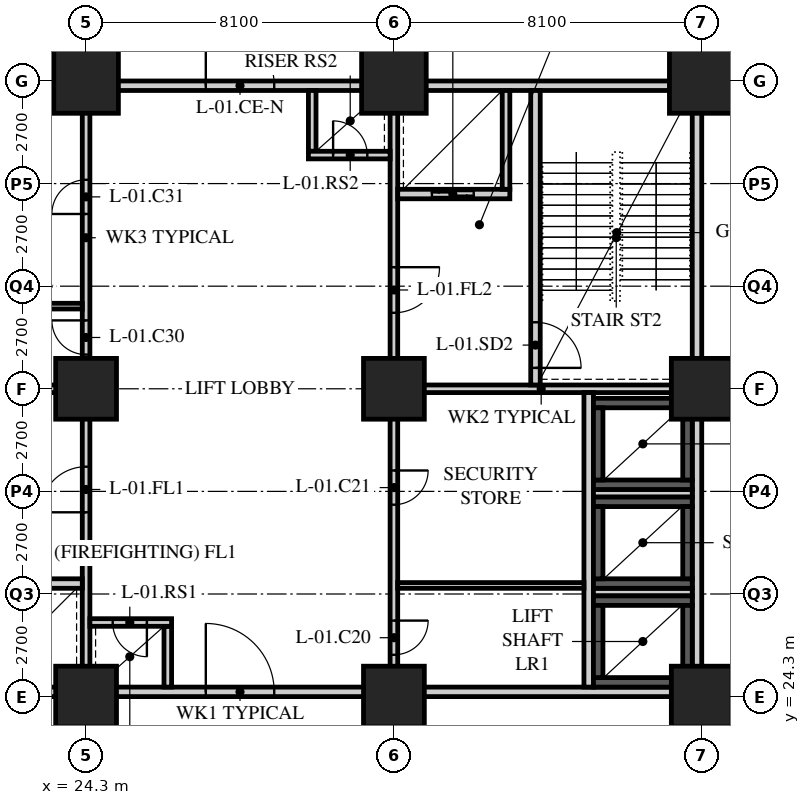
"""IFC4 building model, lengths in metres.
Left out: names, types, materials, properties, quantities, classifications, styles, units other than length and angle.
Written with IfcOpenShell. Run it as: python <this file> out.ifc"""

import sys

from ifc_helpers import new_model, si_unit, direction, frame, frame_2d, origin, origin_2d, place, context, subcontext, project, spatial, rectangle, hollow_rectangle, extrude, element, fill, save


model = new_model("IFC4")
c1 = context("Model", 3, precision=1e-05, world=origin(), true_north=direction((0.0, 1.0)))
c2 = subcontext(c1, "Body", "Model", "MODEL_VIEW")
j1 = project(units=[si_unit("LENGTHUNIT", "METRE"), si_unit("PLANEANGLEUNIT", "RADIAN")], contexts=[c1])
p1 = place(None, origin())
s1 = spatial("IfcSite", under=j1, at=p1, CompositionType="ELEMENT")
p2 = place(p1, origin())
s2 = spatial("IfcBuilding", under=s1, at=p2, CompositionType="ELEMENT")
p3 = place(p2, frame((0.0, 0.0, -4.2)))
s3 = spatial("IfcBuildingStorey", under=s2, at=p3, CompositionType="ELEMENT", Elevation=-4.2)
for number, where, z_axis, x_axis in (
    (1, (24.3, 24.3, 0.0), (0.0, 0.0, 1.0), (1.0, 0.0, 0.0)),
    (2, (24.3, 32.4, 0.0), (0.0, 0.0, 1.0), (1.0, 0.0, 0.0)),
):
    element("IfcColumn", number, at=place(p3, frame(where, z_axis=z_axis, x_axis=x_axis)), inside=s3, PredefinedType="COLUMN", context=c2, shape_type="SweptSolid", body=[
        extrude(hollow_rectangle(XDim=1.6, YDim=1.6, WallThickness=0.15, at=origin_2d()), origin(), (0.0, 0.0, 1.0), 4.2),
    ])
p4 = place(p3, frame((24.3, 40.5, 0.0), z_axis=(0.0, 0.0, 1.0), x_axis=(1.0, 0.0, 0.0)))
e3 = element("IfcColumn", 3, at=p4, inside=s3, PredefinedType="COLUMN", context=c2, shape_type="SweptSolid", body=[
    extrude(hollow_rectangle(XDim=1.7, YDim=1.7, WallThickness=0.16, at=origin_2d()), origin(), (0.0, 0.0, 1.0), 4.2),
])
for number, where, z_axis, x_axis in (
    (4, (32.4, 24.3, 0.0), (0.0, 0.0, 1.0), (1.0, 0.0, 0.0)),
    (5, (32.4, 32.4, 0.0), (0.0, 0.0, 1.0), (1.0, 0.0, 0.0)),
):
    element("IfcColumn", number, at=place(p3, frame(where, z_axis=z_axis, x_axis=x_axis)), inside=s3, PredefinedType="COLUMN", context=c2, shape_type="SweptSolid", body=[
        extrude(hollow_rectangle(XDim=1.6, YDim=1.6, WallThickness=0.15, at=origin_2d()), origin(), (0.0, 0.0, 1.0), 4.2),
    ])
p5 = place(p3, frame((32.4, 40.5, 0.0), z_axis=(0.0, 0.0, 1.0), x_axis=(1.0, 0.0, 0.0)))
e6 = element("IfcColumn", 6, at=p5, inside=s3, PredefinedType="COLUMN", context=c2, shape_type="SweptSolid", body=[
    extrude(hollow_rectangle(XDim=1.7, YDim=1.7, WallThickness=0.16, at=origin_2d()), origin(), (0.0, 0.0, 1.0), 4.2),
])
for number, where, z_axis, x_axis in (
    (7, (40.5, 24.3, 0.0), (0.0, 0.0, 1.0), (1.0, 0.0, 0.0)),
    (8, (40.5, 32.4, 0.0), (0.0, 0.0, 1.0), (1.0, 0.0, 0.0)),
):
    element("IfcColumn", number, at=place(p3, frame(where, z_axis=z_axis, x_axis=x_axis)), inside=s3, PredefinedType="COLUMN", context=c2, shape_type="SweptSolid", body=[
        extrude(hollow_rectangle(XDim=1.6, YDim=1.6, WallThickness=0.15, at=origin_2d()), origin(), (0.0, 0.0, 1.0), 4.2),
    ])
p6 = place(p3, frame((40.5, 40.5, 0.0), z_axis=(0.0, 0.0, 1.0), x_axis=(1.0, 0.0, 0.0)))
e9 = element("IfcColumn", 9, at=p6, inside=s3, PredefinedType="COLUMN", context=c2, shape_type="SweptSolid", body=[
    extrude(hollow_rectangle(XDim=1.7, YDim=1.7, WallThickness=0.16, at=origin_2d()), origin(), (0.0, 0.0, 1.0), 4.2),
])
p7 = place(p3, frame((16.2, 24.425, 0.0), z_axis=(0.0, 0.0, 1.0), x_axis=(1.0, 0.0, 0.0)))
e10 = element("IfcWall", 10, at=p7, inside=s3, PredefinedType="SOLIDWALL", context=c2, shape_type="SweptSolid", body=[
    extrude(rectangle(XDim=24.3, YDim=0.25, at=frame_2d((12.15, 0.0))), origin(), (0.0, 0.0, 1.0), 3.3),
])
p8 = place(p7, frame((11.25, 0.0, 0.0)))
e11 = element("IfcOpeningElement", 11, at=p8, cuts=e10, PredefinedType="OPENING", context=c2, shape_type="SweptSolid", body=[
    extrude(rectangle(XDim=1.8, YDim=2.4, at=frame_2d((0.9, 1.2))), frame((0.0, 0.135, 0.0), z_axis=(0.0, -1.0, 0.0), x_axis=(1.0, 0.0, 0.0)), (0.0, 0.0, 1.0), 0.27),
])
p9 = place(p3, frame((16.2, 40.375, 0.0), z_axis=(0.0, 0.0, 1.0), x_axis=(1.0, 0.0, 0.0)))
e12 = element("IfcWall", 12, at=p9, inside=s3, PredefinedType="SOLIDWALL", context=c2, shape_type="SweptSolid", body=[
    extrude(rectangle(XDim=24.3, YDim=0.25, at=frame_2d((12.15, 0.0))), origin(), (0.0, 0.0, 1.0), 3.3),
])
p10 = place(p9, frame((11.25, 0.0, 0.0)))
e13 = element("IfcOpeningElement", 13, at=p10, cuts=e12, PredefinedType="OPENING", context=c2, shape_type="SweptSolid", body=[
    extrude(rectangle(XDim=1.8, YDim=2.4, at=frame_2d((0.9, 1.2))), frame((0.0, 0.135, 0.0), z_axis=(0.0, -1.0, 0.0), x_axis=(1.0, 0.0, 0.0)), (0.0, 0.0, 1.0), 0.27),
])
p11 = place(p3, frame((40.375, 24.55, 0.0), z_axis=(0.0, 0.0, 1.0), x_axis=(0.0, 1.0, 0.0)))
e14 = element("IfcWall", 14, at=p11, inside=s3, PredefinedType="SOLIDWALL", context=c2, shape_type="SweptSolid", body=[
    extrude(rectangle(XDim=15.7, YDim=0.25, at=frame_2d((7.85, 0.0))), origin(), (0.0, 0.0, 1.0), 3.338),
])
p12 = place(p3, frame((16.45, 32.4, 0.0), z_axis=(0.0, 0.0, 1.0), x_axis=(1.0, 0.0, 0.0)))
e15 = element("IfcWall", 15, at=p12, inside=s3, PredefinedType="SOLIDWALL", context=c2, shape_type="SweptSolid", body=[
    extrude(rectangle(XDim=7.95, YDim=0.2, at=frame_2d((3.975, 0.0))), origin(), (0.0, 0.0, 1.0), 3.25),
])
p13 = place(p3, frame((24.3, 24.55, 0.0), z_axis=(0.0, 0.0, 1.0), x_axis=(0.0, 1.0, 0.0)))
e16 = element("IfcWall", 16, at=p13, inside=s3, PredefinedType="SOLIDWALL", context=c2, shape_type="SweptSolid", body=[
    extrude(rectangle(XDim=7.75, YDim=0.2, at=frame_2d((3.875, 0.0))), origin(), (0.0, 0.0, 1.0), 3.25),
])
p14 = place(p13, frame((4.6, 0.0, 0.0)))
e17 = element("IfcOpeningElement", 17, at=p14, cuts=e16, PredefinedType="OPENING", context=c2, shape_type="SweptSolid", body=[
    extrude(rectangle(XDim=1.2, YDim=2.1, at=frame_2d((0.6, 1.05))), frame((0.0, 0.11, 0.0), z_axis=(0.0, -1.0, 0.0), x_axis=(1.0, 0.0, 0.0)), (0.0, 0.0, 1.0), 0.22),
])
p15 = place(p3, frame((21.25, 27.275, 0.0), z_axis=(0.0, 0.0, 1.0), x_axis=(1.0, 0.0, 0.0)))
e18 = element("IfcWall", 18, at=p15, inside=s3, PredefinedType="SOLIDWALL", context=c2, shape_type="SweptSolid", body=[
    extrude(rectangle(XDim=2.95, YDim=0.25, at=frame_2d((1.475, 0.0))), origin(), (0.0, 0.0, 1.0), 3.95),
])
p16 = place(p15, frame((0.95, 0.0, 0.0)))
e19 = element("IfcOpeningElement", 19, at=p16, cuts=e18, PredefinedType="OPENING", context=c2, shape_type="SweptSolid", body=[
    extrude(rectangle(XDim=1.1, YDim=2.4, at=frame_2d((0.55, 1.2))), frame((0.0, 0.135, 0.0), z_axis=(0.0, -1.0, 0.0), x_axis=(1.0, 0.0, 0.0)), (0.0, 0.0, 1.0), 0.27),
])
p17 = place(p3, frame((26.45, 24.55, 0.0), z_axis=(0.0, 0.0, 1.0), x_axis=(0.0, 1.0, 0.0)))
e20 = element("IfcWall", 20, at=p17, inside=s3, PredefinedType="SOLIDWALL", context=c2, shape_type="SweptSolid", body=[
    extrude(rectangle(XDim=1.6, YDim=0.2, at=frame_2d((0.8, 0.0))), origin(), (0.0, 0.0, 1.0), 3.95),
])
p18 = place(p3, frame((24.4, 26.25, 0.0), z_axis=(0.0, 0.0, 1.0), x_axis=(1.0, 0.0, 0.0)))
e21 = element("IfcWall", 21, at=p18, inside=s3, PredefinedType="SOLIDWALL", context=c2, shape_type="SweptSolid", body=[
    extrude(rectangle(XDim=2.15, YDim=0.2, at=frame_2d((1.075, 0.0))), origin(), (0.0, 0.0, 1.0), 3.95),
])
p19 = place(p18, frame((0.6, 0.0, 0.0)))
e22 = element("IfcOpeningElement", 22, at=p19, cuts=e21, PredefinedType="OPENING", context=c2, shape_type="SweptSolid", body=[
    extrude(rectangle(XDim=0.9, YDim=2.1, at=frame_2d((0.45, 1.05))), frame((0.0, 0.11, 0.0), z_axis=(0.0, -1.0, 0.0), x_axis=(1.0, 0.0, 0.0)), (0.0, 0.0, 1.0), 0.22),
])
p20 = place(p3, frame((32.3, 32.4, 0.0), z_axis=(0.0, 0.0, 1.0), x_axis=(1.0, 0.0, 0.0)))
e23 = element("IfcWall", 23, at=p20, inside=s3, PredefinedType="SOLIDWALL", context=c2, shape_type="SweptSolid", body=[
    extrude(rectangle(XDim=7.95, YDim=0.2, at=frame_2d((3.975, 0.0))), origin(), (0.0, 0.0, 1.0), 3.25),
])
p21 = place(p3, frame((32.4, 32.5, 0.0), z_axis=(0.0, 0.0, 1.0), x_axis=(0.0, 1.0, 0.0)))
e24 = element("IfcWall", 24, at=p21, inside=s3, PredefinedType="SOLIDWALL", context=c2, shape_type="SweptSolid", body=[
    extrude(rectangle(XDim=7.75, YDim=0.2, at=frame_2d((3.875, 0.0))), origin(), (0.0, 0.0, 1.0), 3.25),
])
p22 = place(p21, frame((1.9, 0.0, 0.0)))
e25 = element("IfcOpeningElement", 25, at=p22, cuts=e24, PredefinedType="OPENING", context=c2, shape_type="SweptSolid", body=[
    extrude(rectangle(XDim=1.2, YDim=2.1, at=frame_2d((0.6, 1.05))), frame((0.0, 0.11, 0.0), z_axis=(0.0, -1.0, 0.0), x_axis=(1.0, 0.0, 0.0)), (0.0, 0.0, 1.0), 0.22),
])
p23 = place(p3, frame((37.525, 24.55, 0.0), z_axis=(0.0, 0.0, 1.0), x_axis=(0.0, 1.0, 0.0)))
e26 = element("IfcWall", 26, at=p23, inside=s3, PredefinedType="SOLIDWALL", context=c2, shape_type="SweptSolid", body=[
    extrude(rectangle(XDim=7.75, YDim=0.25, at=frame_2d((3.875, 0.0))), origin(), (0.0, 0.0, 1.0), 3.95),
])
for number, where, z_axis, x_axis in (
    (27, (37.65, 27.05, 0.0), (0.0, 0.0, 1.0), (1.0, 0.0, 0.0)),
    (28, (37.65, 29.65, 0.0), (0.0, 0.0, 1.0), (1.0, 0.0, 0.0)),
):
    element("IfcWall", number, at=place(p3, frame(where, z_axis=z_axis, x_axis=x_axis)), inside=s3, PredefinedType="SOLIDWALL", context=c2, shape_type="SweptSolid", body=[
        extrude(rectangle(XDim=2.6, YDim=0.2, at=frame_2d((1.3, 0.0))), origin(), (0.0, 0.0, 1.0), 3.95),
    ])
p24 = place(p3, frame((36.125, 32.5, 0.0), z_axis=(0.0, 0.0, 1.0), x_axis=(0.0, 1.0, 0.0)))
e29 = element("IfcWall", 29, at=p24, inside=s3, PredefinedType="SOLIDWALL", context=c2, shape_type="SweptSolid", body=[
    extrude(rectangle(XDim=7.75, YDim=0.25, at=frame_2d((3.875, 0.0))), origin(), (0.0, 0.0, 1.0), 3.95),
])
p25 = place(p24, frame((0.45, 0.0, 0.0)))
e30 = element("IfcOpeningElement", 30, at=p25, cuts=e29, PredefinedType="OPENING", context=c2, shape_type="SweptSolid", body=[
    extrude(rectangle(XDim=1.2, YDim=2.1, at=frame_2d((0.6, 1.05))), frame((0.0, 0.135, 0.0), z_axis=(0.0, -1.0, 0.0), x_axis=(1.0, 0.0, 0.0)), (0.0, 0.0, 1.0), 0.27),
])
p26 = place(p3, frame((32.5, 37.525, 0.0), z_axis=(0.0, 0.0, 1.0), x_axis=(1.0, 0.0, 0.0)))
e31 = element("IfcWall", 31, at=p26, inside=s3, PredefinedType="SOLIDWALL", context=c2, shape_type="SweptSolid", body=[
    extrude(rectangle(XDim=2.95, YDim=0.25, at=frame_2d((1.475, 0.0))), origin(), (0.0, 0.0, 1.0), 3.95),
])
p27 = place(p26, frame((0.9, 0.0, 0.0)))
e32 = element("IfcOpeningElement", 32, at=p27, cuts=e31, PredefinedType="OPENING", context=c2, shape_type="SweptSolid", body=[
    extrude(rectangle(XDim=1.1, YDim=2.4, at=frame_2d((0.55, 1.2))), frame((0.0, 0.135, 0.0), z_axis=(0.0, -1.0, 0.0), x_axis=(1.0, 0.0, 0.0)), (0.0, 0.0, 1.0), 0.27),
])
p28 = place(p3, frame((35.35, 37.65, 0.0), z_axis=(0.0, 0.0, 1.0), x_axis=(0.0, 1.0, 0.0)))
e33 = element("IfcWall", 33, at=p28, inside=s3, PredefinedType="SOLIDWALL", context=c2, shape_type="SweptSolid", body=[
    extrude(rectangle(XDim=2.6, YDim=0.2, at=frame_2d((1.3, 0.0))), origin(), (0.0, 0.0, 1.0), 3.95),
])
p29 = place(p3, frame((30.25, 38.65, 0.0), z_axis=(0.0, 0.0, 1.0), x_axis=(0.0, 1.0, 0.0)))
e34 = element("IfcWall", 34, at=p29, inside=s3, PredefinedType="SOLIDWALL", context=c2, shape_type="SweptSolid", body=[
    extrude(rectangle(XDim=1.6, YDim=0.2, at=frame_2d((0.8, 0.0))), origin(), (0.0, 0.0, 1.0), 3.95),
])
p30 = place(p3, frame((30.15, 38.55, 0.0), z_axis=(0.0, 0.0, 1.0), x_axis=(1.0, 0.0, 0.0)))
e35 = element("IfcWall", 35, at=p30, inside=s3, PredefinedType="SOLIDWALL", context=c2, shape_type="SweptSolid", body=[
    extrude(rectangle(XDim=2.15, YDim=0.2, at=frame_2d((1.075, 0.0))), origin(), (0.0, 0.0, 1.0), 3.95),
])
p31 = place(p30, frame((0.65, 0.0, 0.0)))
e36 = element("IfcOpeningElement", 36, at=p31, cuts=e35, PredefinedType="OPENING", context=c2, shape_type="SweptSolid", body=[
    extrude(rectangle(XDim=0.9, YDim=2.1, at=frame_2d((0.45, 1.05))), frame((0.0, 0.11, 0.0), z_axis=(0.0, -1.0, 0.0), x_axis=(1.0, 0.0, 0.0)), (0.0, 0.0, 1.0), 0.22),
])
p32 = place(p3, frame((24.3, 32.5, 0.0), z_axis=(0.0, 0.0, 1.0), x_axis=(0.0, 1.0, 0.0)))
e37 = element("IfcWall", 37, at=p32, inside=s3, PredefinedType="PARTITIONING", context=c2, shape_type="SweptSolid", body=[
    extrude(rectangle(XDim=7.75, YDim=0.2, at=frame_2d((3.875, 0.0))), origin(), (0.0, 0.0, 1.0), 3.25),
])
p33 = place(p32, frame((0.8, 0.0, 0.0)))
e38 = element("IfcOpeningElement", 38, at=p33, cuts=e37, PredefinedType="OPENING", context=c2, shape_type="SweptSolid", body=[
    extrude(rectangle(XDim=0.9, YDim=2.1, at=frame_2d((0.45, 1.05))), frame((0.0, 0.11, 0.0), z_axis=(0.0, -1.0, 0.0), x_axis=(1.0, 0.0, 0.0)), (0.0, 0.0, 1.0), 0.22),
])
p34 = place(p32, frame((4.5, 0.0, 0.0)))
e39 = element("IfcOpeningElement", 39, at=p34, cuts=e37, PredefinedType="OPENING", context=c2, shape_type="SweptSolid", body=[
    extrude(rectangle(XDim=0.9, YDim=2.1, at=frame_2d((0.45, 1.05))), frame((0.0, 0.11, 0.0), z_axis=(0.0, -1.0, 0.0), x_axis=(1.0, 0.0, 0.0)), (0.0, 0.0, 1.0), 0.22),
])
p35 = place(p3, frame((19.3, 34.575, 0.0), z_axis=(0.0, 0.0, 1.0), x_axis=(1.0, 0.0, 0.0)))
e40 = element("IfcWall", 40, at=p35, inside=s3, PredefinedType="PARTITIONING", context=c2, shape_type="SweptSolid", body=[
    extrude(rectangle(XDim=4.9, YDim=0.15, at=frame_2d((2.45, 0.0))), origin(), (0.0, 0.0, 1.0), 3.95),
])
p36 = place(p3, frame((32.4, 24.55, 0.0), z_axis=(0.0, 0.0, 1.0), x_axis=(0.0, 1.0, 0.0)))
e41 = element("IfcWall", 41, at=p36, inside=s3, PredefinedType="PARTITIONING", context=c2, shape_type="SweptSolid", body=[
    extrude(rectangle(XDim=7.75, YDim=0.2, at=frame_2d((3.875, 0.0))), origin(), (0.0, 0.0, 1.0), 3.25),
])
p37 = place(p36, frame((0.85, 0.0, 0.0)))
e42 = element("IfcOpeningElement", 42, at=p37, cuts=e41, PredefinedType="OPENING", context=c2, shape_type="SweptSolid", body=[
    extrude(rectangle(XDim=0.9, YDim=2.1, at=frame_2d((0.45, 1.05))), frame((0.0, 0.11, 0.0), z_axis=(0.0, -1.0, 0.0), x_axis=(1.0, 0.0, 0.0)), (0.0, 0.0, 1.0), 0.22),
])
p38 = place(p36, frame((4.8, 0.0, 0.0)))
e43 = element("IfcOpeningElement", 43, at=p38, cuts=e41, PredefinedType="OPENING", context=c2, shape_type="SweptSolid", body=[
    extrude(rectangle(XDim=0.9, YDim=2.1, at=frame_2d((0.45, 1.05))), frame((0.0, 0.11, 0.0), z_axis=(0.0, -1.0, 0.0), x_axis=(1.0, 0.0, 0.0)), (0.0, 0.0, 1.0), 0.22),
])
p39 = place(p3, frame((32.5, 27.225, 0.0), z_axis=(0.0, 0.0, 1.0), x_axis=(1.0, 0.0, 0.0)))
e44 = element("IfcWall", 44, at=p39, inside=s3, PredefinedType="PARTITIONING", context=c2, shape_type="SweptSolid", body=[
    extrude(rectangle(XDim=4.9, YDim=0.15, at=frame_2d((2.45, 0.0))), origin(), (0.0, 0.0, 1.0), 3.95),
])
for number, where, z_axis, x_axis in (
    (45, (37.65, 24.675, 0.0), (0.0, 0.0, 1.0), (1.0, 0.0, 0.0)),
    (46, (37.65, 26.825, 0.0), (0.0, 0.0, 1.0), (1.0, 0.0, 0.0)),
):
    element("IfcWall", number, at=place(p3, frame(where, z_axis=z_axis, x_axis=x_axis)), inside=s3, PredefinedType="SOLIDWALL", context=c2, shape_type="SweptSolid", body=[
        extrude(rectangle(XDim=2.6, YDim=0.25, at=frame_2d((1.3, 0.0))), origin(), (0.0, 0.0, 1.0), 2.4),
    ])
for number, where, z_axis, x_axis in (
    (47, (37.775, 24.8, 0.0), (0.0, 0.0, 1.0), (0.0, 1.0, 0.0)),
    (48, (40.125, 24.8, 0.0), (0.0, 0.0, 1.0), (0.0, 1.0, 0.0)),
):
    element("IfcWall", number, at=place(p3, frame(where, z_axis=z_axis, x_axis=x_axis)), inside=s3, PredefinedType="SOLIDWALL", context=c2, shape_type="SweptSolid", body=[
        extrude(rectangle(XDim=1.9, YDim=0.25, at=frame_2d((0.95, 0.0))), origin(), (0.0, 0.0, 1.0), 2.4),
    ])
for number, where, z_axis, x_axis in (
    (49, (37.65, 27.275, 0.0), (0.0, 0.0, 1.0), (1.0, 0.0, 0.0)),
    (50, (37.65, 29.425, 0.0), (0.0, 0.0, 1.0), (1.0, 0.0, 0.0)),
):
    element("IfcWall", number, at=place(p3, frame(where, z_axis=z_axis, x_axis=x_axis)), inside=s3, PredefinedType="SOLIDWALL", context=c2, shape_type="SweptSolid", body=[
        extrude(rectangle(XDim=2.6, YDim=0.25, at=frame_2d((1.3, 0.0))), origin(), (0.0, 0.0, 1.0), 2.4),
    ])
for number, where, z_axis, x_axis in (
    (51, (37.775, 27.4, 0.0), (0.0, 0.0, 1.0), (0.0, 1.0, 0.0)),
    (52, (40.125, 27.4, 0.0), (0.0, 0.0, 1.0), (0.0, 1.0, 0.0)),
):
    element("IfcWall", number, at=place(p3, frame(where, z_axis=z_axis, x_axis=x_axis)), inside=s3, PredefinedType="SOLIDWALL", context=c2, shape_type="SweptSolid", body=[
        extrude(rectangle(XDim=1.9, YDim=0.25, at=frame_2d((0.95, 0.0))), origin(), (0.0, 0.0, 1.0), 2.4),
    ])
for number, where, z_axis, x_axis in (
    (53, (37.65, 29.875, 0.0), (0.0, 0.0, 1.0), (1.0, 0.0, 0.0)),
    (54, (37.65, 32.025, 0.0), (0.0, 0.0, 1.0), (1.0, 0.0, 0.0)),
):
    element("IfcWall", number, at=place(p3, frame(where, z_axis=z_axis, x_axis=x_axis)), inside=s3, PredefinedType="SOLIDWALL", context=c2, shape_type="SweptSolid", body=[
        extrude(rectangle(XDim=2.6, YDim=0.25, at=frame_2d((1.3, 0.0))), origin(), (0.0, 0.0, 1.0), 2.4),
    ])
for number, where, z_axis, x_axis in (
    (55, (37.775, 30.0, 0.0), (0.0, 0.0, 1.0), (0.0, 1.0, 0.0)),
    (56, (40.125, 30.0, 0.0), (0.0, 0.0, 1.0), (0.0, 1.0, 0.0)),
):
    element("IfcWall", number, at=place(p3, frame(where, z_axis=z_axis, x_axis=x_axis)), inside=s3, PredefinedType="SOLIDWALL", context=c2, shape_type="SweptSolid", body=[
        extrude(rectangle(XDim=1.9, YDim=0.25, at=frame_2d((0.95, 0.0))), origin(), (0.0, 0.0, 1.0), 2.4),
    ])
p40 = place(p33, origin())
e57 = element("IfcDoor", 57, at=p40, inside=s3, OperationType="SINGLE_SWING_RIGHT", PredefinedType="DOOR", context=c2, shape_type="SweptSolid", body=[
    extrude(rectangle(XDim=0.9, YDim=2.1, at=frame_2d((0.45, 1.05))), frame((0.0, 0.025, 0.0), z_axis=(0.0, -1.0, 0.0), x_axis=(1.0, 0.0, 0.0)), (0.0, 0.0, 1.0), 0.05),
])
fill(e38, e57)
p41 = place(p34, origin())
e58 = element("IfcDoor", 58, at=p41, inside=s3, OperationType="SINGLE_SWING_LEFT", PredefinedType="DOOR", context=c2, shape_type="SweptSolid", body=[
    extrude(rectangle(XDim=0.9, YDim=2.1, at=frame_2d((0.45, 1.05))), frame((0.0, 0.025, 0.0), z_axis=(0.0, -1.0, 0.0), x_axis=(1.0, 0.0, 0.0)), (0.0, 0.0, 1.0), 0.05),
])
fill(e39, e58)
p42 = place(p37, origin())
e59 = element("IfcDoor", 59, at=p42, inside=s3, OperationType="SINGLE_SWING_LEFT", PredefinedType="DOOR", context=c2, shape_type="SweptSolid", body=[
    extrude(rectangle(XDim=0.9, YDim=2.1, at=frame_2d((0.45, 1.05))), frame((0.0, 0.025, 0.0), z_axis=(0.0, -1.0, 0.0), x_axis=(1.0, 0.0, 0.0)), (0.0, 0.0, 1.0), 0.05),
])
fill(e42, e59)
p43 = place(p38, origin())
e60 = element("IfcDoor", 60, at=p43, inside=s3, OperationType="SINGLE_SWING_LEFT", PredefinedType="DOOR", context=c2, shape_type="SweptSolid", body=[
    extrude(rectangle(XDim=0.9, YDim=2.1, at=frame_2d((0.45, 1.05))), frame((0.0, 0.025, 0.0), z_axis=(0.0, -1.0, 0.0), x_axis=(1.0, 0.0, 0.0)), (0.0, 0.0, 1.0), 0.05),
])
fill(e43, e60)
p44 = place(p14, origin())
e61 = element("IfcDoor", 61, at=p44, inside=s3, OperationType="SINGLE_SWING_LEFT", PredefinedType="DOOR", context=c2, shape_type="SweptSolid", body=[
    extrude(rectangle(XDim=1.2, YDim=2.1, at=frame_2d((0.6, 1.05))), frame((0.0, 0.025, 0.0), z_axis=(0.0, -1.0, 0.0), x_axis=(1.0, 0.0, 0.0)), (0.0, 0.0, 1.0), 0.05),
])
fill(e17, e61)
p45 = place(p19, origin())
e62 = element("IfcDoor", 62, at=p45, inside=s3, OperationType="SINGLE_SWING_LEFT", PredefinedType="DOOR", context=c2, shape_type="SweptSolid", body=[
    extrude(rectangle(XDim=0.9, YDim=2.1, at=frame_2d((0.45, 1.05))), frame((0.0, 0.025, 0.0), z_axis=(0.0, -1.0, 0.0), x_axis=(1.0, 0.0, 0.0)), (0.0, 0.0, 1.0), 0.05),
])
fill(e22, e62)
p46 = place(p25, origin())
e63 = element("IfcDoor", 63, at=p46, inside=s3, OperationType="SINGLE_SWING_RIGHT", PredefinedType="DOOR", context=c2, shape_type="SweptSolid", body=[
    extrude(rectangle(XDim=1.2, YDim=2.1, at=frame_2d((0.6, 1.05))), frame((0.0, 0.025, 0.0), z_axis=(0.0, -1.0, 0.0), x_axis=(1.0, 0.0, 0.0)), (0.0, 0.0, 1.0), 0.05),
])
fill(e30, e63)
p47 = place(p22, origin())
e64 = element("IfcDoor", 64, at=p47, inside=s3, OperationType="SINGLE_SWING_LEFT", PredefinedType="DOOR", context=c2, shape_type="SweptSolid", body=[
    extrude(rectangle(XDim=1.2, YDim=2.1, at=frame_2d((0.6, 1.05))), frame((0.0, 0.025, 0.0), z_axis=(0.0, -1.0, 0.0), x_axis=(1.0, 0.0, 0.0)), (0.0, 0.0, 1.0), 0.05),
])
fill(e25, e64)
p48 = place(p31, origin())
e65 = element("IfcDoor", 65, at=p48, inside=s3, OperationType="SINGLE_SWING_LEFT", PredefinedType="DOOR", context=c2, shape_type="SweptSolid", body=[
    extrude(rectangle(XDim=0.9, YDim=2.1, at=frame_2d((0.45, 1.05))), frame((0.0, 0.025, 0.0), z_axis=(0.0, -1.0, 0.0), x_axis=(1.0, 0.0, 0.0)), (0.0, 0.0, 1.0), 0.05),
])
fill(e36, e65)
p49 = place(p27, origin())
e66 = element("IfcDoor", 66, at=p49, inside=s3, OperationType="DOUBLE_DOOR_SLIDING", PredefinedType="DOOR", context=c2, shape_type="SweptSolid", body=[
    extrude(rectangle(XDim=1.1, YDim=2.4, at=frame_2d((0.55, 1.2))), frame((0.0, 0.025, 0.0), z_axis=(0.0, -1.0, 0.0), x_axis=(1.0, 0.0, 0.0)), (0.0, 0.0, 1.0), 0.05),
])
fill(e32, e66)
p50 = place(p8, origin())
e67 = element("IfcDoor", 67, at=p50, inside=s3, OperationType="DOUBLE_DOOR_SINGLE_SWING", PredefinedType="DOOR", context=c2, shape_type="SweptSolid", body=[
    extrude(rectangle(XDim=1.8, YDim=2.4, at=frame_2d((0.9, 1.2))), frame((0.0, 0.025, 0.0), z_axis=(0.0, -1.0, 0.0), x_axis=(1.0, 0.0, 0.0)), (0.0, 0.0, 1.0), 0.05),
])
fill(e11, e67)
p51 = place(p10, origin())
e68 = element("IfcDoor", 68, at=p51, inside=s3, OperationType="DOUBLE_DOOR_SINGLE_SWING", PredefinedType="DOOR", context=c2, shape_type="SweptSolid", body=[
    extrude(rectangle(XDim=1.8, YDim=2.4, at=frame_2d((0.9, 1.2))), frame((0.0, 0.025, 0.0), z_axis=(0.0, -1.0, 0.0), x_axis=(1.0, 0.0, 0.0)), (0.0, 0.0, 1.0), 0.05),
])
fill(e13, e68)
save(model, sys.argv[1])
